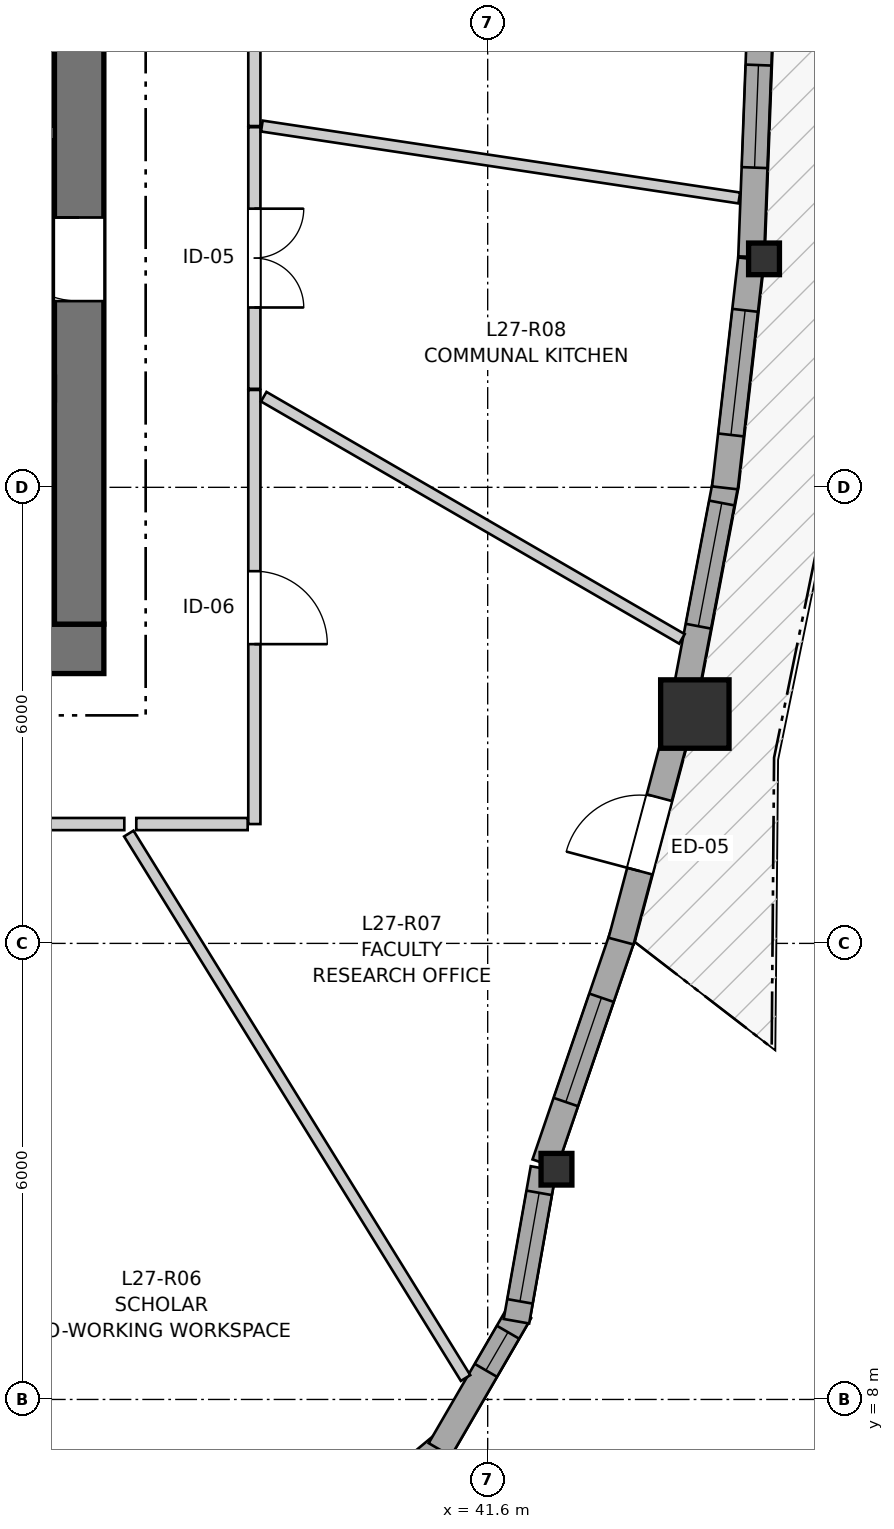
"""IFC4 building model, lengths in metres.
Left out: names, types, materials, properties, quantities, classifications, styles, units other than length and angle.
Written with IfcOpenShell. Run it as: python <this file> out.ifc"""

import sys

from ifc_helpers import new_model, si_unit, direction, frame, frame_2d, origin, origin_2d, place, context, subcontext, project, spatial, rectangle, i_section, extrude, source, transform, mapped, element, fill, save


model = new_model("IFC4")
c1 = context("Model", 3, precision=1e-05, world=origin(), true_north=direction((0.0, 1.0)))
c2 = subcontext(c1, "Body", "Model", "MODEL_VIEW")
j1 = project(units=[si_unit("LENGTHUNIT", "METRE"), si_unit("PLANEANGLEUNIT", "RADIAN")], contexts=[c1])
p1 = place(None, origin())
s1 = spatial("IfcSite", under=j1, at=p1, CompositionType="ELEMENT")
p2 = place(p1, origin())
s2 = spatial("IfcBuilding", under=s1, at=p2, CompositionType="ELEMENT")
p3 = place(p2, frame((0.0, 0.0, 92.8)))
s3 = spatial("IfcBuildingStorey", under=s2, at=p3, CompositionType="ELEMENT", Elevation=92.8)
p4 = place(p3, frame((24.15, 17.875, 0.0), z_axis=(0.0, 0.0, 1.0), x_axis=(1.0, 0.0, 0.0)))
e1 = element("IfcWall", 1, at=p4, inside=s3, PredefinedType="SHEAR", context=c2, shape_type="SweptSolid", body=[
    extrude(rectangle(XDim=12.4, YDim=0.65, at=frame_2d((6.2, 0.0))), origin(), (0.0, 0.0, 1.0), 2.95),
])
p5 = place(p3, frame((36.225, 18.2, 0.0), z_axis=(0.0, 0.0, 1.0), x_axis=(0.0, 1.0, 0.0)))
e2 = element("IfcWall", 2, at=p5, inside=s3, PredefinedType="SHEAR", context=c2, shape_type="SweptSolid", body=[
    extrude(rectangle(XDim=15.6, YDim=0.65, at=frame_2d((7.8, 0.0))), origin(), (0.0, 0.0, 1.0), 2.95),
])
p6 = place(p5, frame((4.25, 0.0, 0.0)))
e3 = element("IfcOpeningElement", 3, at=p6, cuts=e2, PredefinedType="OPENING", context=c2, shape_type="SweptSolid", body=[
    extrude(rectangle(XDim=1.1, YDim=2.15, at=frame_2d((0.55, 1.075))), frame((0.0, 0.335, 0.0), z_axis=(0.0, -1.0, 0.0), x_axis=(1.0, 0.0, 0.0)), (0.0, 0.0, 1.0), 0.67),
])
p7 = place(p5, frame((10.25, 0.0, 0.0)))
e4 = element("IfcOpeningElement", 4, at=p7, cuts=e2, PredefinedType="OPENING", context=c2, shape_type="SweptSolid", body=[
    extrude(rectangle(XDim=1.1, YDim=2.15, at=frame_2d((0.55, 1.075))), frame((0.0, 0.335, 0.0), z_axis=(0.0, -1.0, 0.0), x_axis=(1.0, 0.0, 0.0)), (0.0, 0.0, 1.0), 0.67),
])
p8 = place(p3, frame((24.8, 21.3, 0.0), z_axis=(0.0, 0.0, 1.0), x_axis=(1.0, 0.0, 0.0)))
e5 = element("IfcWall", 5, at=p8, inside=s3, PredefinedType="SHEAR", context=c2, shape_type="SweptSolid", body=[
    extrude(rectangle(XDim=11.1, YDim=0.3, at=frame_2d((5.55, 0.0))), origin(), (0.0, 0.0, 1.0), 2.95),
])
p9 = place(p8, frame((6.22, 0.0, 0.0)))
e6 = element("IfcOpeningElement", 6, at=p9, cuts=e5, PredefinedType="OPENING", context=c2, shape_type="SweptSolid", body=[
    extrude(rectangle(XDim=0.98, YDim=2.15, at=frame_2d((0.49, 1.075))), frame((0.0, 0.16, 0.0), z_axis=(0.0, -1.0, 0.0), x_axis=(1.0, 0.0, 0.0)), (0.0, 0.0, 1.0), 0.32),
])
p10 = place(p8, frame((9.15, 0.0, 0.0)))
e7 = element("IfcOpeningElement", 7, at=p10, cuts=e5, PredefinedType="OPENING", context=c2, shape_type="SweptSolid", body=[
    extrude(rectangle(XDim=1.15, YDim=2.15, at=frame_2d((0.575, 1.075))), frame((0.0, 0.16, 0.0), z_axis=(0.0, -1.0, 0.0), x_axis=(1.0, 0.0, 0.0)), (0.0, 0.0, 1.0), 0.32),
])
m1 = source(origin(), c2, "Body", "SweptSolid", [
    extrude(i_section(OverallWidth=0.406, OverallDepth=0.416, WebThickness=0.027, FlangeThickness=0.044, FilletRadius=0.015, at=origin_2d()), origin(), (0.0, 0.0, 1.0), 2.95),
])
p11 = place(p3, frame((42.505, 11.029, 0.0), z_axis=(0.0, 0.0, 1.0), x_axis=(1.0, 0.0, 0.0)))
e8 = element("IfcColumn", 8, at=p11, inside=s3, PredefinedType="PILASTER", context=c2, shape_type="MappedRepresentation", body=[
    mapped(m1, transform((0.0, 0.0, 0.0), x_axis=(1.0, 0.0, 0.0), y_axis=(0.0, 1.0, 0.0), z_axis=(0.0, 0.0, 1.0), scale=1.0)),
])
m2 = source(origin(), c2, "Body", "SweptSolid", [
    extrude(rectangle(XDim=0.9, YDim=0.9, at=origin_2d()), origin(), (0.0, 0.0, 1.0), 2.95),
])
p12 = place(p3, frame((44.325, 17.017, 0.0), z_axis=(0.0, 0.0, 1.0), x_axis=(1.0, 0.0, 0.0)))
e9 = element("IfcColumn", 9, at=p12, inside=s3, PredefinedType="COLUMN", context=c2, shape_type="MappedRepresentation", body=[
    mapped(m2, transform((0.0, 0.0, 0.0), x_axis=(1.0, 0.0, 0.0), y_axis=(0.0, 1.0, 0.0), z_axis=(0.0, 0.0, 1.0), scale=1.0)),
])
p13 = place(p3, frame((45.236, 23.006, 0.0), z_axis=(0.0, 0.0, 1.0), x_axis=(1.0, 0.0, 0.0)))
e10 = element("IfcColumn", 10, at=p13, inside=s3, PredefinedType="PILASTER", context=c2, shape_type="MappedRepresentation", body=[
    mapped(m1, transform((0.0, 0.0, 0.0), x_axis=(1.0, 0.0, 0.0), y_axis=(0.0, 1.0, 0.0), z_axis=(0.0, 0.0, 1.0), scale=1.0)),
])
p14 = place(p3, frame((39.444, 6.099, 0.0), z_axis=(0.0, 0.0, 1.0), x_axis=(0.768497696041, 0.639852554249, 0.0)))
e11 = element("IfcWall", 11, at=p14, inside=s3, PredefinedType="SOLIDWALL", context=c2, shape_type="SweptSolid", body=[
    extrude(rectangle(XDim=2.099, YDim=0.34, at=frame_2d((1.049, 0.0))), origin(), (0.0, 0.0, 1.0), 2.48),
])
p15 = place(p14, frame((0.574, 0.0, 0.82)))
e12 = element("IfcOpeningElement", 12, at=p15, cuts=e11, PredefinedType="OPENING", context=c2, shape_type="SweptSolid", body=[
    extrude(rectangle(XDim=0.95, YDim=1.35, at=frame_2d((0.475, 0.675))), frame((0.0, 0.18, 0.0), z_axis=(0.0, -1.0, 0.0), x_axis=(1.0, 0.0, 0.0)), (0.0, 0.0, 1.0), 0.36),
])
p16 = place(p3, frame((40.971, 7.34, 0.0), z_axis=(0.0, 0.0, 1.0), x_axis=(0.501902596059, 0.864924149315, 0.0)))
e13 = element("IfcWall", 13, at=p16, inside=s3, PredefinedType="SOLIDWALL", context=c2, shape_type="SweptSolid", body=[
    extrude(rectangle(XDim=2.099, YDim=0.34, at=frame_2d((1.049, 0.0))), origin(), (0.0, 0.0, 1.0), 2.48),
])
p17 = place(p16, frame((1.206, 0.0, 0.82)))
e14 = element("IfcOpeningElement", 14, at=p17, cuts=e13, PredefinedType="OPENING", context=c2, shape_type="SweptSolid", body=[
    extrude(rectangle(XDim=0.58, YDim=1.35, at=frame_2d((0.29, 0.675))), frame((0.0, 0.18, 0.0), z_axis=(0.0, -1.0, 0.0), x_axis=(1.0, 0.0, 0.0)), (0.0, 0.0, 1.0), 0.36),
])
p18 = place(p3, frame((41.978, 9.029, 0.0), z_axis=(0.0, 0.0, 1.0), x_axis=(0.174283452483, 0.984695525627, 0.0)))
e15 = element("IfcWall", 15, at=p18, inside=s3, PredefinedType="SOLIDWALL", context=c2, shape_type="SweptSolid", body=[
    extrude(rectangle(XDim=2.041, YDim=0.34, at=frame_2d((1.021, 0.0))), origin(), (0.0, 0.0, 1.0), 2.48),
])
p19 = place(p18, frame((0.265, 0.0, 0.82)))
e16 = element("IfcOpeningElement", 16, at=p19, cuts=e15, PredefinedType="OPENING", context=c2, shape_type="SweptSolid", body=[
    extrude(rectangle(XDim=1.45, YDim=1.25, at=frame_2d((0.725, 0.625))), frame((0.0, 0.18, 0.0), z_axis=(0.0, -1.0, 0.0), x_axis=(1.0, 0.0, 0.0)), (0.0, 0.0, 1.0), 0.36),
])
p20 = place(p3, frame((42.351, 11.103, 0.0), z_axis=(0.0, 0.0, 1.0), x_axis=(0.323582854182, 0.946199839611, 0.0)))
e17 = element("IfcWall", 17, at=p20, inside=s3, PredefinedType="SOLIDWALL", context=c2, shape_type="SweptSolid", body=[
    extrude(rectangle(XDim=3.182, YDim=0.34, at=frame_2d((1.591, 0.0))), origin(), (0.0, 0.0, 1.0), 2.48),
])
p21 = place(p20, frame((0.856, 0.0, 0.82)))
e18 = element("IfcOpeningElement", 18, at=p21, cuts=e17, PredefinedType="OPENING", context=c2, shape_type="SweptSolid", body=[
    extrude(rectangle(XDim=1.45, YDim=1.25, at=frame_2d((0.725, 0.625))), frame((0.0, 0.18, 0.0), z_axis=(0.0, -1.0, 0.0), x_axis=(1.0, 0.0, 0.0)), (0.0, 0.0, 1.0), 0.36),
])
p22 = place(p3, frame((43.355, 14.03, 0.0), z_axis=(0.0, 0.0, 1.0), x_axis=(0.257056088809, 0.96639648551, 0.0)))
e19 = element("IfcWall", 19, at=p22, inside=s3, PredefinedType="SOLIDWALL", context=c2, shape_type="SweptSolid", body=[
    extrude(rectangle(XDim=2.906, YDim=0.34, at=frame_2d((1.453, 0.0))), origin(), (0.0, 0.0, 1.0), 2.48),
])
p23 = place(p22, frame((0.953, 0.0, 0.0)))
e20 = element("IfcOpeningElement", 20, at=p23, cuts=e19, PredefinedType="OPENING", context=c2, shape_type="SweptSolid", body=[
    extrude(rectangle(XDim=1.0, YDim=2.1, at=frame_2d((0.5, 1.05))), frame((0.0, 0.18, 0.0), z_axis=(0.0, -1.0, 0.0), x_axis=(1.0, 0.0, 0.0)), (0.0, 0.0, 1.0), 0.36),
])
p24 = place(p3, frame((44.201, 17.275, 0.0), z_axis=(0.0, 0.0, 1.0), x_axis=(0.186703550023, 0.982416298933, 0.0)))
e21 = element("IfcWall", 21, at=p24, inside=s3, PredefinedType="SOLIDWALL", context=c2, shape_type="SweptSolid", body=[
    extrude(rectangle(XDim=2.856, YDim=0.34, at=frame_2d((1.428, 0.0))), origin(), (0.0, 0.0, 1.0), 2.48),
])
p25 = place(p24, frame((0.914, 0.0, 0.82)))
e22 = element("IfcOpeningElement", 22, at=p25, cuts=e21, PredefinedType="OPENING", context=c2, shape_type="SweptSolid", body=[
    extrude(rectangle(XDim=1.65, YDim=1.45, at=frame_2d((0.825, 0.725))), frame((0.0, 0.18, 0.0), z_axis=(0.0, -1.0, 0.0), x_axis=(1.0, 0.0, 0.0)), (0.0, 0.0, 1.0), 0.36),
])
p26 = place(p3, frame((44.721, 19.993, 0.0), z_axis=(0.0, 0.0, 1.0), x_axis=(0.113224078967, 0.993569478165, 0.0)))
e23 = element("IfcWall", 23, at=p26, inside=s3, PredefinedType="SOLIDWALL", context=c2, shape_type="SweptSolid", body=[
    extrude(rectangle(XDim=3.032, YDim=0.34, at=frame_2d((1.516, 0.0))), origin(), (0.0, 0.0, 1.0), 2.48),
])
p27 = place(p26, frame((0.701, 0.0, 0.82)))
e24 = element("IfcOpeningElement", 24, at=p27, cuts=e23, PredefinedType="OPENING", context=c2, shape_type="SweptSolid", body=[
    extrude(rectangle(XDim=1.65, YDim=1.45, at=frame_2d((0.825, 0.725))), frame((0.0, 0.18, 0.0), z_axis=(0.0, -1.0, 0.0), x_axis=(1.0, 0.0, 0.0)), (0.0, 0.0, 1.0), 0.36),
])
p28 = place(p3, frame((45.067, 23.032, 0.0), z_axis=(0.0, 0.0, 1.0), x_axis=(0.037985210196, 0.999278301479, 0.0)))
e25 = element("IfcWall", 25, at=p28, inside=s3, PredefinedType="SOLIDWALL", context=c2, shape_type="SweptSolid", body=[
    extrude(rectangle(XDim=3.014, YDim=0.34, at=frame_2d((1.507, 0.0))), origin(), (0.0, 0.0, 1.0), 2.48),
])
p29 = place(p28, frame((1.175, 0.0, 0.82)))
e26 = element("IfcOpeningElement", 26, at=p29, cuts=e25, PredefinedType="OPENING", context=c2, shape_type="SweptSolid", body=[
    extrude(rectangle(XDim=1.35, YDim=1.45, at=frame_2d((0.675, 0.725))), frame((0.0, 0.18, 0.0), z_axis=(0.0, -1.0, 0.0), x_axis=(1.0, 0.0, 0.0)), (0.0, 0.0, 1.0), 0.36),
])
p30 = place(p3, frame((30.67, 24.66, 0.0), z_axis=(0.0, 0.0, 1.0), x_axis=(1.0, 0.0, 0.0)))
e27 = element("IfcWall", 27, at=p30, inside=s3, PredefinedType="PARTITIONING", context=c2, shape_type="SweptSolid", body=[
    extrude(rectangle(XDim=5.22, YDim=0.18, at=frame_2d((2.61, 0.0))), origin(), (0.0, 0.0, 1.0), 2.95),
])
p31 = place(p30, frame((0.68, 0.0, 0.0)))
e28 = element("IfcOpeningElement", 28, at=p31, cuts=e27, PredefinedType="OPENING", context=c2, shape_type="SweptSolid", body=[
    extrude(rectangle(XDim=0.98, YDim=2.15, at=frame_2d((0.49, 1.075))), frame((0.0, 0.1, 0.0), z_axis=(0.0, -1.0, 0.0), x_axis=(1.0, 0.0, 0.0)), (0.0, 0.0, 1.0), 0.2),
])
p32 = place(p3, frame((38.53, 21.281, 0.0), z_axis=(0.0, 0.0, 1.0), x_axis=(0.0, -1.0, 0.0)))
e29 = element("IfcWall", 29, at=p32, inside=s3, PredefinedType="PARTITIONING", context=c2, shape_type="SweptSolid", body=[
    extrude(rectangle(XDim=5.711, YDim=0.16, at=frame_2d((2.855, 0.0))), origin(), (0.0, 0.0, 1.0), 2.95),
])
p33 = place(p32, frame((2.384, 0.0, 0.0)))
e30 = element("IfcOpeningElement", 30, at=p33, cuts=e29, PredefinedType="OPENING", context=c2, shape_type="SweptSolid", body=[
    extrude(rectangle(XDim=0.96, YDim=2.1, at=frame_2d((0.48, 1.05))), frame((0.0, 0.09, 0.0), z_axis=(0.0, -1.0, 0.0), x_axis=(1.0, 0.0, 0.0)), (0.0, 0.0, 1.0), 0.18),
])
p34 = place(p3, frame((38.53, 29.22, 0.0), z_axis=(0.0, 0.0, 1.0), x_axis=(0.0, -1.0, 0.0)))
e31 = element("IfcWall", 31, at=p34, inside=s3, PredefinedType="PARTITIONING", context=c2, shape_type="SweptSolid", body=[
    extrude(rectangle(XDim=4.467, YDim=0.16, at=frame_2d((2.233, 0.0))), origin(), (0.0, 0.0, 1.0), 2.95),
])
p35 = place(p34, frame((1.584, 0.0, 0.0)))
e32 = element("IfcOpeningElement", 32, at=p35, cuts=e31, PredefinedType="OPENING", context=c2, shape_type="SweptSolid", body=[
    extrude(rectangle(XDim=1.3, YDim=2.1, at=frame_2d((0.65, 1.05))), frame((0.0, 0.09, 0.0), z_axis=(0.0, -1.0, 0.0), x_axis=(1.0, 0.0, 0.0)), (0.0, 0.0, 1.0), 0.18),
])
p36 = place(p3, frame((36.819, 15.57, 0.0), z_axis=(0.0, 0.0, 1.0), x_axis=(-1.0, 0.0, 0.0)))
e33 = element("IfcWall", 33, at=p36, inside=s3, PredefinedType="PARTITIONING", context=c2, shape_type="SweptSolid", body=[
    extrude(rectangle(XDim=3.956, YDim=0.16, at=frame_2d((1.978, 0.0))), origin(), (0.0, 0.0, 1.0), 2.95),
])
p37 = place(p36, frame((1.522, 0.0, 0.0)))
e34 = element("IfcOpeningElement", 34, at=p37, cuts=e33, PredefinedType="OPENING", context=c2, shape_type="SweptSolid", body=[
    extrude(rectangle(XDim=0.96, YDim=2.1, at=frame_2d((0.48, 1.05))), frame((0.0, 0.09, 0.0), z_axis=(0.0, -1.0, 0.0), x_axis=(1.0, 0.0, 0.0)), (0.0, 0.0, 1.0), 0.18),
])
p38 = place(p3, frame((38.53, 24.738, 0.0), z_axis=(0.0, 0.0, 1.0), x_axis=(0.0, -1.0, 0.0)))
e35 = element("IfcWall", 35, at=p38, inside=s3, PredefinedType="PARTITIONING", context=c2, shape_type="SweptSolid", body=[
    extrude(rectangle(XDim=3.442, YDim=0.16, at=frame_2d((1.721, 0.0))), origin(), (0.0, 0.0, 1.0), 2.95),
])
p39 = place(p38, frame((1.072, 0.0, 0.0)))
e36 = element("IfcOpeningElement", 36, at=p39, cuts=e35, PredefinedType="OPENING", context=c2, shape_type="SweptSolid", body=[
    extrude(rectangle(XDim=1.3, YDim=2.1, at=frame_2d((0.65, 1.05))), frame((0.0, 0.09, 0.0), z_axis=(0.0, -1.0, 0.0), x_axis=(1.0, 0.0, 0.0)), (0.0, 0.0, 1.0), 0.18),
])
p40 = place(p3, frame((36.878, 15.445, 0.0), z_axis=(0.0, 0.0, 1.0), x_axis=(0.526001305793, -0.850483760165, 0.0)))
e37 = element("IfcWall", 37, at=p40, inside=s3, PredefinedType="PARTITIONING", context=c2, shape_type="SweptSolid", body=[
    extrude(rectangle(XDim=8.422, YDim=0.145, at=frame_2d((4.211, 0.0))), origin(), (0.0, 0.0, 1.0), 2.95),
])
p41 = place(p3, frame((38.653, 21.193, 0.0), z_axis=(0.0, 0.0, 1.0), x_axis=(0.865364941279, -0.501142213753, 0.0)))
e38 = element("IfcWall", 38, at=p41, inside=s3, PredefinedType="PARTITIONING", context=c2, shape_type="SweptSolid", body=[
    extrude(rectangle(XDim=6.359, YDim=0.145, at=frame_2d((3.179, 0.0))), origin(), (0.0, 0.0, 1.0), 2.95),
])
p42 = place(p3, frame((38.629, 24.753, 0.0), z_axis=(0.0, 0.0, 1.0), x_axis=(0.988841427723, -0.148971912852, 0.0)))
e39 = element("IfcWall", 39, at=p42, inside=s3, PredefinedType="PARTITIONING", context=c2, shape_type="SweptSolid", body=[
    extrude(rectangle(XDim=6.352, YDim=0.145, at=frame_2d((3.176, 0.0))), origin(), (0.0, 0.0, 1.0), 2.95),
])
p43 = place(p3, frame((36.977, 15.57, 0.0), z_axis=(0.0, 0.0, 1.0), x_axis=(1.0, 0.0, 0.0)))
e40 = element("IfcWall", 40, at=p43, inside=s3, PredefinedType="PARTITIONING", context=c2, shape_type="SweptSolid", body=[
    extrude(rectangle(XDim=1.465, YDim=0.16, at=frame_2d((0.732, 0.0))), origin(), (0.0, 0.0, 1.0), 2.95),
])
m3 = source(origin(), c2, "Body", "SweptSolid", [
    extrude(rectangle(XDim=0.58, YDim=1.35, at=frame_2d((0.29, 0.675))), frame((0.0, 0.03, 0.0), z_axis=(0.0, -1.0, 0.0), x_axis=(1.0, 0.0, 0.0)), (0.0, 0.0, 1.0), 0.06),
])
p44 = place(p17, origin())
e41 = element("IfcWindow", 41, at=p44, inside=s3, PartitioningType="SINGLE_PANEL", PredefinedType="WINDOW", context=c2, shape_type="MappedRepresentation", body=[
    mapped(m3, transform((0.0, 0.0, 0.0), x_axis=(1.0, 0.0, 0.0), y_axis=(0.0, 1.0, 0.0), z_axis=(0.0, 0.0, 1.0), scale=1.0)),
])
fill(e14, e41)
m4 = source(origin(), c2, "Body", "SweptSolid", [
    extrude(rectangle(XDim=1.45, YDim=1.25, at=frame_2d((0.725, 0.625))), frame((0.0, 0.03, 0.0), z_axis=(0.0, -1.0, 0.0), x_axis=(1.0, 0.0, 0.0)), (0.0, 0.0, 1.0), 0.06),
])
p45 = place(p19, origin())
e42 = element("IfcWindow", 42, at=p45, inside=s3, PartitioningType="SINGLE_PANEL", PredefinedType="WINDOW", context=c2, shape_type="MappedRepresentation", body=[
    mapped(m4, transform((0.0, 0.0, 0.0), x_axis=(1.0, 0.0, 0.0), y_axis=(0.0, 1.0, 0.0), z_axis=(0.0, 0.0, 1.0), scale=1.0)),
])
fill(e16, e42)
p46 = place(p21, origin())
e43 = element("IfcWindow", 43, at=p46, inside=s3, PartitioningType="SINGLE_PANEL", PredefinedType="WINDOW", context=c2, shape_type="MappedRepresentation", body=[
    mapped(m4, transform((0.0, 0.0, 0.0), x_axis=(1.0, 0.0, 0.0), y_axis=(0.0, 1.0, 0.0), z_axis=(0.0, 0.0, 1.0), scale=1.0)),
])
fill(e18, e43)
m5 = source(origin(), c2, "Body", "SweptSolid", [
    extrude(rectangle(XDim=1.65, YDim=1.45, at=frame_2d((0.825, 0.725))), frame((0.0, 0.03, 0.0), z_axis=(0.0, -1.0, 0.0), x_axis=(1.0, 0.0, 0.0)), (0.0, 0.0, 1.0), 0.06),
])
p47 = place(p25, origin())
e44 = element("IfcWindow", 44, at=p47, inside=s3, PartitioningType="SINGLE_PANEL", PredefinedType="WINDOW", context=c2, shape_type="MappedRepresentation", body=[
    mapped(m5, transform((0.0, 0.0, 0.0), x_axis=(1.0, 0.0, 0.0), y_axis=(0.0, 1.0, 0.0), z_axis=(0.0, 0.0, 1.0), scale=1.0)),
])
fill(e22, e44)
p48 = place(p27, origin())
e45 = element("IfcWindow", 45, at=p48, inside=s3, PartitioningType="SINGLE_PANEL", PredefinedType="WINDOW", context=c2, shape_type="MappedRepresentation", body=[
    mapped(m5, transform((0.0, 0.0, 0.0), x_axis=(1.0, 0.0, 0.0), y_axis=(0.0, 1.0, 0.0), z_axis=(0.0, 0.0, 1.0), scale=1.0)),
])
fill(e24, e45)
m6 = source(origin(), c2, "Body", "SweptSolid", [
    extrude(rectangle(XDim=1.35, YDim=1.45, at=frame_2d((0.675, 0.725))), frame((0.0, 0.03, 0.0), z_axis=(0.0, -1.0, 0.0), x_axis=(1.0, 0.0, 0.0)), (0.0, 0.0, 1.0), 0.06),
])
p49 = place(p29, origin())
e46 = element("IfcWindow", 46, at=p49, inside=s3, PartitioningType="SINGLE_PANEL", PredefinedType="WINDOW", context=c2, shape_type="MappedRepresentation", body=[
    mapped(m6, transform((0.0, 0.0, 0.0), x_axis=(1.0, 0.0, 0.0), y_axis=(0.0, 1.0, 0.0), z_axis=(0.0, 0.0, 1.0), scale=1.0)),
])
fill(e26, e46)
m7 = source(origin(), c2, "Body", "SweptSolid", [
    extrude(rectangle(XDim=1.0, YDim=2.1, at=frame_2d((0.5, 1.05))), frame((0.0, 0.025, 0.0), z_axis=(0.0, -1.0, 0.0), x_axis=(1.0, 0.0, 0.0)), (0.0, 0.0, 1.0), 0.05),
])
p50 = place(p23, origin())
e47 = element("IfcDoor", 47, at=p50, inside=s3, OperationType="SINGLE_SWING_LEFT", PredefinedType="DOOR", context=c2, shape_type="MappedRepresentation", body=[
    mapped(m7, transform((0.0, 0.0, 0.0), x_axis=(1.0, 0.0, 0.0), y_axis=(0.0, 1.0, 0.0), z_axis=(0.0, 0.0, 1.0), scale=1.0)),
])
fill(e20, e47)
m8 = source(origin(), c2, "Body", "SweptSolid", [
    extrude(rectangle(XDim=1.1, YDim=2.15, at=frame_2d((0.55, 1.075))), frame((0.0, 0.025, 0.0), z_axis=(0.0, -1.0, 0.0), x_axis=(1.0, 0.0, 0.0)), (0.0, 0.0, 1.0), 0.05),
])
p51 = place(p6, origin())
e48 = element("IfcDoor", 48, at=p51, inside=s3, OperationType="SINGLE_SWING_RIGHT", PredefinedType="DOOR", context=c2, shape_type="MappedRepresentation", body=[
    mapped(m8, transform((0.0, 0.0, 0.0), x_axis=(1.0, 0.0, 0.0), y_axis=(0.0, 1.0, 0.0), z_axis=(0.0, 0.0, 1.0), scale=1.0)),
])
fill(e3, e48)
m9 = source(origin(), c2, "Body", "SweptSolid", [
    extrude(rectangle(XDim=0.96, YDim=2.1, at=frame_2d((0.48, 1.05))), frame((0.0, 0.025, 0.0), z_axis=(0.0, -1.0, 0.0), x_axis=(1.0, 0.0, 0.0)), (0.0, 0.0, 1.0), 0.05),
])
p52 = place(p33, origin())
e49 = element("IfcDoor", 49, at=p52, inside=s3, OperationType="SINGLE_SWING_RIGHT", PredefinedType="DOOR", context=c2, shape_type="MappedRepresentation", body=[
    mapped(m9, transform((0.0, 0.0, 0.0), x_axis=(1.0, 0.0, 0.0), y_axis=(0.0, 1.0, 0.0), z_axis=(0.0, 0.0, 1.0), scale=1.0)),
])
fill(e30, e49)
m10 = source(origin(), c2, "Body", "SweptSolid", [
    extrude(rectangle(XDim=1.3, YDim=2.1, at=frame_2d((0.65, 1.05))), frame((0.0, 0.025, 0.0), z_axis=(0.0, -1.0, 0.0), x_axis=(1.0, 0.0, 0.0)), (0.0, 0.0, 1.0), 0.05),
])
p53 = place(p39, origin())
e50 = element("IfcDoor", 50, at=p53, inside=s3, OperationType="DOUBLE_DOOR_SINGLE_SWING", PredefinedType="DOOR", context=c2, shape_type="MappedRepresentation", body=[
    mapped(m10, transform((0.0, 0.0, 0.0), x_axis=(1.0, 0.0, 0.0), y_axis=(0.0, 1.0, 0.0), z_axis=(0.0, 0.0, 1.0), scale=1.0)),
])
fill(e36, e50)
save(model, sys.argv[1])
